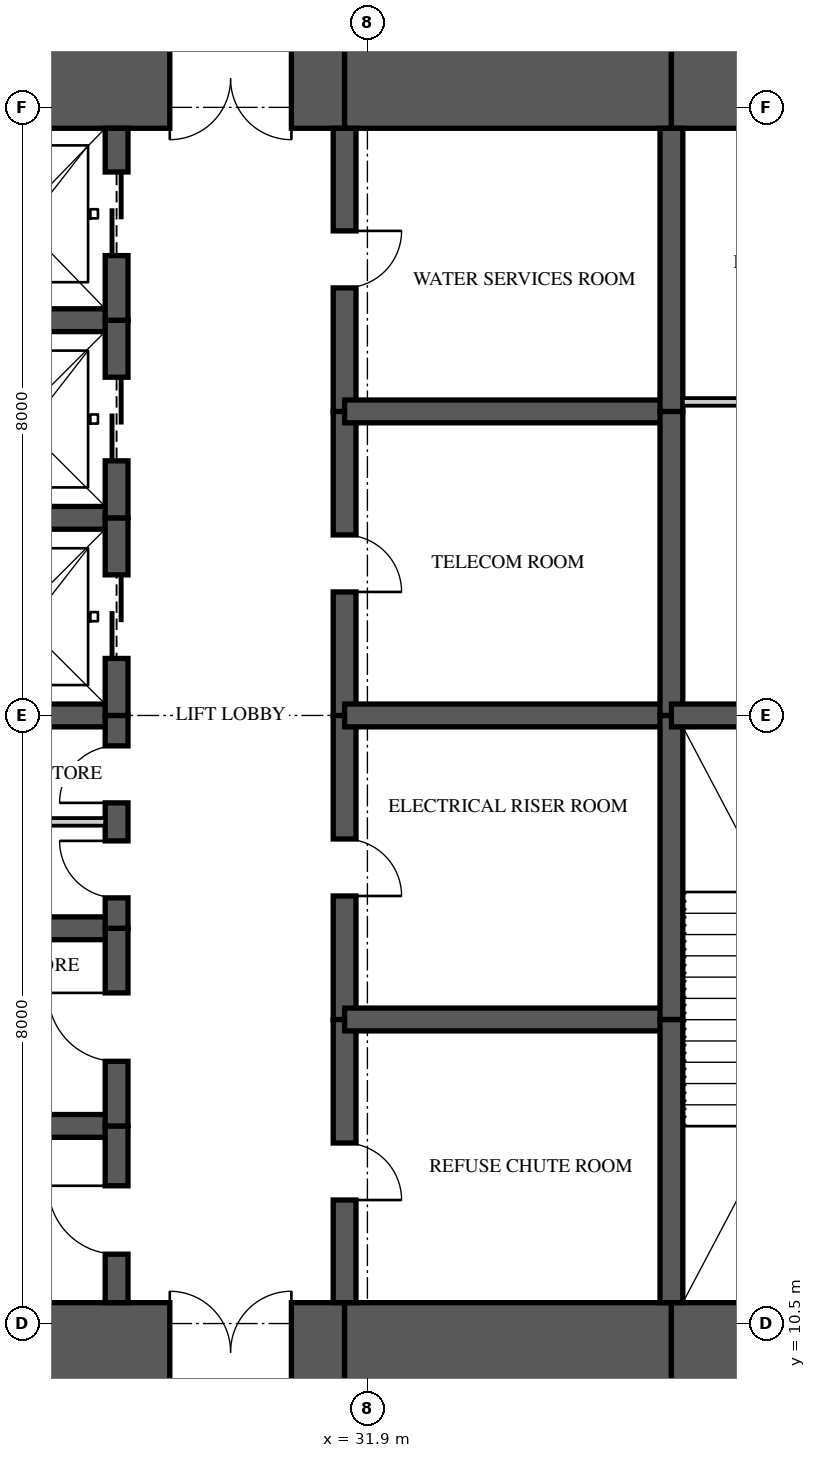
"""IFC4 building model, lengths in metres.
Left out: names, types, materials, properties, quantities, classifications, styles, units other than length and angle.
Written with IfcOpenShell. Run it as: python <this file> out.ifc"""

import sys

from ifc_helpers import new_model, si_unit, direction, frame, frame_2d, origin, place, context, subcontext, project, spatial, rectangle, extrude, element, fill, save


model = new_model("IFC4")
c1 = context("Model", 3, precision=1e-05, world=origin(), true_north=direction((0.0, 1.0)))
c2 = subcontext(c1, "Body", "Model", "MODEL_VIEW")
j1 = project(units=[si_unit("LENGTHUNIT", "METRE"), si_unit("PLANEANGLEUNIT", "RADIAN")], contexts=[c1])
p1 = place(None, origin())
s1 = spatial("IfcSite", under=j1, at=p1, CompositionType="ELEMENT")
p2 = place(p1, origin())
s2 = spatial("IfcBuilding", under=s1, at=p2, CompositionType="ELEMENT")
p3 = place(p2, frame((0.0, 0.0, 184.5)))
s3 = spatial("IfcBuildingStorey", under=s2, at=p3, CompositionType="ELEMENT", Elevation=184.5)
p4 = place(p3, frame((26.0, 10.125, 0.0), z_axis=(0.0, 0.0, 1.0), x_axis=(1.0, 0.0, 0.0)))
e1 = element("IfcWall", 1, at=p4, inside=s3, PredefinedType="SHEAR", context=c2, shape_type="SweptSolid", body=[
    extrude(rectangle(XDim=5.6, YDim=1.3, at=frame_2d((2.8, 0.0))), origin(), (0.0, 0.0, 1.0), 3.35),
])
p5 = place(p4, frame((3.3, 0.0, 0.0)))
e2 = element("IfcOpeningElement", 2, at=p5, cuts=e1, PredefinedType="OPENING", context=c2, shape_type="SweptSolid", body=[
    extrude(rectangle(XDim=1.6, YDim=2.1, at=frame_2d((0.8, 1.05))), frame((0.0, 0.66, 0.0), z_axis=(0.0, -1.0, 0.0), x_axis=(1.0, 0.0, 0.0)), (0.0, 0.0, 1.0), 1.32),
])
p6 = place(p3, frame((31.6, 10.125, 0.0), z_axis=(0.0, 0.0, 1.0), x_axis=(1.0, 0.0, 0.0)))
e3 = element("IfcWall", 3, at=p6, inside=s3, PredefinedType="SHEAR", context=c2, shape_type="SweptSolid", body=[
    extrude(rectangle(XDim=4.3, YDim=1.3, at=frame_2d((2.15, 0.0))), origin(), (0.0, 0.0, 1.0), 3.35),
])
p7 = place(p3, frame((35.9, 10.125, 0.0), z_axis=(0.0, 0.0, 1.0), x_axis=(1.0, 0.0, 0.0)))
e4 = element("IfcWall", 4, at=p7, inside=s3, PredefinedType="SHEAR", context=c2, shape_type="SweptSolid", body=[
    extrude(rectangle(XDim=8.25, YDim=1.3, at=frame_2d((4.125, 0.0))), origin(), (0.0, 0.0, 1.0), 3.35),
])
p8 = place(p7, frame((2.7, 0.0, 0.0)))
e5 = element("IfcOpeningElement", 5, at=p8, cuts=e4, PredefinedType="OPENING", context=c2, shape_type="SweptSolid", body=[
    extrude(rectangle(XDim=1.0, YDim=2.1, at=frame_2d((0.5, 1.05))), frame((0.0, 0.66, 0.0), z_axis=(0.0, -1.0, 0.0), x_axis=(1.0, 0.0, 0.0)), (0.0, 0.0, 1.0), 1.32),
])
p9 = place(p3, frame((44.15, 26.875, 0.0), z_axis=(0.0, 0.0, 1.0), x_axis=(-1.0, 0.0, 0.0)))
e6 = element("IfcWall", 6, at=p9, inside=s3, PredefinedType="SHEAR", context=c2, shape_type="SweptSolid", body=[
    extrude(rectangle(XDim=8.25, YDim=1.3, at=frame_2d((4.125, 0.0))), origin(), (0.0, 0.0, 1.0), 3.35),
])
p10 = place(p9, frame((5.65, 0.0, 0.0)))
e7 = element("IfcOpeningElement", 7, at=p10, cuts=e6, PredefinedType="OPENING", context=c2, shape_type="SweptSolid", body=[
    extrude(rectangle(XDim=0.9, YDim=2.1, at=frame_2d((0.45, 1.05))), frame((0.0, 0.66, 0.0), z_axis=(0.0, -1.0, 0.0), x_axis=(1.0, 0.0, 0.0)), (0.0, 0.0, 1.0), 1.32),
])
p11 = place(p3, frame((35.9, 26.875, 0.0), z_axis=(0.0, 0.0, 1.0), x_axis=(-1.0, 0.0, 0.0)))
e8 = element("IfcWall", 8, at=p11, inside=s3, PredefinedType="SHEAR", context=c2, shape_type="SweptSolid", body=[
    extrude(rectangle(XDim=4.3, YDim=1.3, at=frame_2d((2.15, 0.0))), origin(), (0.0, 0.0, 1.0), 3.35),
])
p12 = place(p3, frame((31.6, 26.875, 0.0), z_axis=(0.0, 0.0, 1.0), x_axis=(-1.0, 0.0, 0.0)))
e9 = element("IfcWall", 9, at=p12, inside=s3, PredefinedType="SHEAR", context=c2, shape_type="SweptSolid", body=[
    extrude(rectangle(XDim=5.6, YDim=1.3, at=frame_2d((2.8, 0.0))), origin(), (0.0, 0.0, 1.0), 3.35),
])
p13 = place(p12, frame((0.7, 0.0, 0.0)))
e10 = element("IfcOpeningElement", 10, at=p13, cuts=e9, PredefinedType="OPENING", context=c2, shape_type="SweptSolid", body=[
    extrude(rectangle(XDim=1.6, YDim=2.1, at=frame_2d((0.8, 1.05))), frame((0.0, 0.66, 0.0), z_axis=(0.0, -1.0, 0.0), x_axis=(1.0, 0.0, 0.0)), (0.0, 0.0, 1.0), 1.32),
])
p14 = place(p3, frame((28.6, 10.775, 0.0), z_axis=(0.0, 0.0, 1.0), x_axis=(0.0, 1.0, 0.0)))
e11 = element("IfcWall", 11, at=p14, inside=s3, PredefinedType="SHEAR", context=c2, shape_type="SweptSolid", body=[
    extrude(rectangle(XDim=2.325, YDim=0.3, at=frame_2d((1.163, 0.0))), origin(), (0.0, 0.0, 1.0), 3.35),
])
p15 = place(p14, frame((0.637, 0.0, 0.0)))
e12 = element("IfcOpeningElement", 12, at=p15, cuts=e11, PredefinedType="OPENING", context=c2, shape_type="SweptSolid", body=[
    extrude(rectangle(XDim=0.9, YDim=2.1, at=frame_2d((0.45, 1.05))), frame((0.0, 0.16, 0.0), z_axis=(0.0, -1.0, 0.0), x_axis=(1.0, 0.0, 0.0)), (0.0, 0.0, 1.0), 0.32),
])
p16 = place(p3, frame((28.6, 13.1, 0.0), z_axis=(0.0, 0.0, 1.0), x_axis=(0.0, 1.0, 0.0)))
e13 = element("IfcWall", 13, at=p16, inside=s3, PredefinedType="SHEAR", context=c2, shape_type="SweptSolid", body=[
    extrude(rectangle(XDim=2.6, YDim=0.3, at=frame_2d((1.3, 0.0))), origin(), (0.0, 0.0, 1.0), 3.35),
])
p17 = place(p16, frame((0.85, 0.0, 0.0)))
e14 = element("IfcOpeningElement", 14, at=p17, cuts=e13, PredefinedType="OPENING", context=c2, shape_type="SweptSolid", body=[
    extrude(rectangle(XDim=0.9, YDim=2.1, at=frame_2d((0.45, 1.05))), frame((0.0, 0.16, 0.0), z_axis=(0.0, -1.0, 0.0), x_axis=(1.0, 0.0, 0.0)), (0.0, 0.0, 1.0), 0.32),
])
p18 = place(p3, frame((28.6, 15.7, 0.0), z_axis=(0.0, 0.0, 1.0), x_axis=(0.0, 1.0, 0.0)))
e15 = element("IfcWall", 15, at=p18, inside=s3, PredefinedType="SHEAR", context=c2, shape_type="SweptSolid", body=[
    extrude(rectangle(XDim=2.8, YDim=0.3, at=frame_2d((1.4, 0.0))), origin(), (0.0, 0.0, 1.0), 3.35),
])
p19 = place(p18, frame((0.4, 0.0, 0.0)))
e16 = element("IfcOpeningElement", 16, at=p19, cuts=e15, PredefinedType="OPENING", context=c2, shape_type="SweptSolid", body=[
    extrude(rectangle(XDim=0.75, YDim=2.1, at=frame_2d((0.375, 1.05))), frame((0.0, 0.16, 0.0), z_axis=(0.0, -1.0, 0.0), x_axis=(1.0, 0.0, 0.0)), (0.0, 0.0, 1.0), 0.32),
])
p20 = place(p18, frame((1.65, 0.0, 0.0)))
e17 = element("IfcOpeningElement", 17, at=p20, cuts=e15, PredefinedType="OPENING", context=c2, shape_type="SweptSolid", body=[
    extrude(rectangle(XDim=0.75, YDim=2.1, at=frame_2d((0.375, 1.05))), frame((0.0, 0.16, 0.0), z_axis=(0.0, -1.0, 0.0), x_axis=(1.0, 0.0, 0.0)), (0.0, 0.0, 1.0), 0.32),
])
p21 = place(p3, frame((28.6, 18.5, 0.0), z_axis=(0.0, 0.0, 1.0), x_axis=(0.0, 1.0, 0.0)))
e18 = element("IfcWall", 18, at=p21, inside=s3, PredefinedType="SHEAR", context=c2, shape_type="SweptSolid", body=[
    extrude(rectangle(XDim=2.6, YDim=0.3, at=frame_2d((1.3, 0.0))), origin(), (0.0, 0.0, 1.0), 3.35),
])
p22 = place(p21, frame((0.75, 0.0, 0.0)))
e19 = element("IfcOpeningElement", 19, at=p22, cuts=e18, PredefinedType="OPENING", context=c2, shape_type="SweptSolid", body=[
    extrude(rectangle(XDim=1.1, YDim=2.1, at=frame_2d((0.55, 1.05))), frame((0.0, 0.16, 0.0), z_axis=(0.0, -1.0, 0.0), x_axis=(1.0, 0.0, 0.0)), (0.0, 0.0, 1.0), 0.32),
])
p23 = place(p3, frame((28.6, 21.1, 0.0), z_axis=(0.0, 0.0, 1.0), x_axis=(0.0, 1.0, 0.0)))
e20 = element("IfcWall", 20, at=p23, inside=s3, PredefinedType="SHEAR", context=c2, shape_type="SweptSolid", body=[
    extrude(rectangle(XDim=2.6, YDim=0.3, at=frame_2d((1.3, 0.0))), origin(), (0.0, 0.0, 1.0), 3.35),
])
p24 = place(p23, frame((0.75, 0.0, 0.0)))
e21 = element("IfcOpeningElement", 21, at=p24, cuts=e20, PredefinedType="OPENING", context=c2, shape_type="SweptSolid", body=[
    extrude(rectangle(XDim=1.1, YDim=2.1, at=frame_2d((0.55, 1.05))), frame((0.0, 0.16, 0.0), z_axis=(0.0, -1.0, 0.0), x_axis=(1.0, 0.0, 0.0)), (0.0, 0.0, 1.0), 0.32),
])
p25 = place(p3, frame((28.6, 23.7, 0.0), z_axis=(0.0, 0.0, 1.0), x_axis=(0.0, 1.0, 0.0)))
e22 = element("IfcWall", 22, at=p25, inside=s3, PredefinedType="SHEAR", context=c2, shape_type="SweptSolid", body=[
    extrude(rectangle(XDim=2.525, YDim=0.3, at=frame_2d((1.263, 0.0))), origin(), (0.0, 0.0, 1.0), 3.35),
])
p26 = place(p25, frame((0.85, 0.0, 0.0)))
e23 = element("IfcOpeningElement", 23, at=p26, cuts=e22, PredefinedType="OPENING", context=c2, shape_type="SweptSolid", body=[
    extrude(rectangle(XDim=1.1, YDim=2.1, at=frame_2d((0.55, 1.05))), frame((0.0, 0.16, 0.0), z_axis=(0.0, -1.0, 0.0), x_axis=(1.0, 0.0, 0.0)), (0.0, 0.0, 1.0), 0.32),
])
p27 = place(p3, frame((31.6, 10.775, 0.0), z_axis=(0.0, 0.0, 1.0), x_axis=(0.0, 1.0, 0.0)))
e24 = element("IfcWall", 24, at=p27, inside=s3, PredefinedType="SHEAR", context=c2, shape_type="SweptSolid", body=[
    extrude(rectangle(XDim=3.725, YDim=0.3, at=frame_2d((1.863, 0.0))), origin(), (0.0, 0.0, 1.0), 3.35),
])
p28 = place(p27, frame((1.35, 0.0, 0.0)))
e25 = element("IfcOpeningElement", 25, at=p28, cuts=e24, PredefinedType="OPENING", context=c2, shape_type="SweptSolid", body=[
    extrude(rectangle(XDim=0.75, YDim=2.1, at=frame_2d((0.375, 1.05))), frame((0.0, 0.16, 0.0), z_axis=(0.0, -1.0, 0.0), x_axis=(1.0, 0.0, 0.0)), (0.0, 0.0, 1.0), 0.32),
])
p29 = place(p3, frame((31.6, 14.5, 0.0), z_axis=(0.0, 0.0, 1.0), x_axis=(0.0, 1.0, 0.0)))
e26 = element("IfcWall", 26, at=p29, inside=s3, PredefinedType="SHEAR", context=c2, shape_type="SweptSolid", body=[
    extrude(rectangle(XDim=4.0, YDim=0.3, at=frame_2d((2.0, 0.0))), origin(), (0.0, 0.0, 1.0), 3.35),
])
p30 = place(p29, frame((1.625, 0.0, 0.0)))
e27 = element("IfcOpeningElement", 27, at=p30, cuts=e26, PredefinedType="OPENING", context=c2, shape_type="SweptSolid", body=[
    extrude(rectangle(XDim=0.75, YDim=2.1, at=frame_2d((0.375, 1.05))), frame((0.0, 0.16, 0.0), z_axis=(0.0, -1.0, 0.0), x_axis=(1.0, 0.0, 0.0)), (0.0, 0.0, 1.0), 0.32),
])
p31 = place(p3, frame((31.6, 18.5, 0.0), z_axis=(0.0, 0.0, 1.0), x_axis=(0.0, 1.0, 0.0)))
e28 = element("IfcWall", 28, at=p31, inside=s3, PredefinedType="SHEAR", context=c2, shape_type="SweptSolid", body=[
    extrude(rectangle(XDim=4.0, YDim=0.3, at=frame_2d((2.0, 0.0))), origin(), (0.0, 0.0, 1.0), 3.35),
])
p32 = place(p31, frame((1.625, 0.0, 0.0)))
e29 = element("IfcOpeningElement", 29, at=p32, cuts=e28, PredefinedType="OPENING", context=c2, shape_type="SweptSolid", body=[
    extrude(rectangle(XDim=0.75, YDim=2.1, at=frame_2d((0.375, 1.05))), frame((0.0, 0.16, 0.0), z_axis=(0.0, -1.0, 0.0), x_axis=(1.0, 0.0, 0.0)), (0.0, 0.0, 1.0), 0.32),
])
p33 = place(p3, frame((31.6, 22.5, 0.0), z_axis=(0.0, 0.0, 1.0), x_axis=(0.0, 1.0, 0.0)))
e30 = element("IfcWall", 30, at=p33, inside=s3, PredefinedType="SHEAR", context=c2, shape_type="SweptSolid", body=[
    extrude(rectangle(XDim=3.725, YDim=0.3, at=frame_2d((1.863, 0.0))), origin(), (0.0, 0.0, 1.0), 3.35),
])
p34 = place(p33, frame((1.625, 0.0, 0.0)))
e31 = element("IfcOpeningElement", 31, at=p34, cuts=e30, PredefinedType="OPENING", context=c2, shape_type="SweptSolid", body=[
    extrude(rectangle(XDim=0.75, YDim=2.1, at=frame_2d((0.375, 1.05))), frame((0.0, 0.16, 0.0), z_axis=(0.0, -1.0, 0.0), x_axis=(1.0, 0.0, 0.0)), (0.0, 0.0, 1.0), 0.32),
])
p35 = place(p3, frame((35.9, 10.775, 0.0), z_axis=(0.0, 0.0, 1.0), x_axis=(0.0, 1.0, 0.0)))
e32 = element("IfcWall", 32, at=p35, inside=s3, PredefinedType="SHEAR", context=c2, shape_type="SweptSolid", body=[
    extrude(rectangle(XDim=3.725, YDim=0.3, at=frame_2d((1.863, 0.0))), origin(), (0.0, 0.0, 1.0), 3.35),
])
for number, where, z_axis, x_axis in (
    (33, (35.9, 14.5, 0.0), (0.0, 0.0, 1.0), (0.0, 1.0, 0.0)),
    (34, (35.9, 18.5, 0.0), (0.0, 0.0, 1.0), (0.0, 1.0, 0.0)),
):
    element("IfcWall", number, at=place(p3, frame(where, z_axis=z_axis, x_axis=x_axis)), inside=s3, PredefinedType="SHEAR", context=c2, shape_type="SweptSolid", body=[
        extrude(rectangle(XDim=4.0, YDim=0.3, at=frame_2d((2.0, 0.0))), origin(), (0.0, 0.0, 1.0), 3.35),
    ])
p36 = place(p3, frame((35.9, 22.5, 0.0), z_axis=(0.0, 0.0, 1.0), x_axis=(0.0, 1.0, 0.0)))
e35 = element("IfcWall", 35, at=p36, inside=s3, PredefinedType="SHEAR", context=c2, shape_type="SweptSolid", body=[
    extrude(rectangle(XDim=3.725, YDim=0.3, at=frame_2d((1.863, 0.0))), origin(), (0.0, 0.0, 1.0), 3.35),
])
for number, where, z_axis, x_axis in (
    (36, (26.0, 13.1, 0.0), (0.0, 0.0, 1.0), (1.0, 0.0, 0.0)),
    (37, (26.0, 15.7, 0.0), (0.0, 0.0, 1.0), (1.0, 0.0, 0.0)),
    (38, (26.0, 18.5, 0.0), (0.0, 0.0, 1.0), (1.0, 0.0, 0.0)),
    (39, (26.0, 21.1, 0.0), (0.0, 0.0, 1.0), (1.0, 0.0, 0.0)),
    (40, (26.0, 23.7, 0.0), (0.0, 0.0, 1.0), (1.0, 0.0, 0.0)),
):
    element("IfcWall", number, at=place(p3, frame(where, z_axis=z_axis, x_axis=x_axis)), inside=s3, PredefinedType="SHEAR", context=c2, shape_type="SweptSolid", body=[
        extrude(rectangle(XDim=2.6, YDim=0.3, at=frame_2d((1.3, 0.0))), origin(), (0.0, 0.0, 1.0), 3.35),
    ])
for number, where, z_axis, x_axis in (
    (41, (31.6, 14.5, 0.0), (0.0, 0.0, 1.0), (1.0, 0.0, 0.0)),
    (42, (31.6, 18.5, 0.0), (0.0, 0.0, 1.0), (1.0, 0.0, 0.0)),
    (43, (31.6, 22.5, 0.0), (0.0, 0.0, 1.0), (1.0, 0.0, 0.0)),
):
    element("IfcWall", number, at=place(p3, frame(where, z_axis=z_axis, x_axis=x_axis)), inside=s3, PredefinedType="SHEAR", context=c2, shape_type="SweptSolid", body=[
        extrude(rectangle(XDim=4.3, YDim=0.3, at=frame_2d((2.15, 0.0))), origin(), (0.0, 0.0, 1.0), 3.35),
    ])
p37 = place(p3, frame((35.9, 18.5, 0.0), z_axis=(0.0, 0.0, 1.0), x_axis=(1.0, 0.0, 0.0)))
e44 = element("IfcWall", 44, at=p37, inside=s3, PredefinedType="SHEAR", context=c2, shape_type="SweptSolid", body=[
    extrude(rectangle(XDim=4.3, YDim=0.3, at=frame_2d((2.15, 0.0))), origin(), (0.0, 0.0, 1.0), 3.35),
])
p38 = place(p3, frame((36.05, 22.625, 0.0), z_axis=(0.0, 0.0, 1.0), x_axis=(1.0, 0.0, 0.0)))
e45 = element("IfcWall", 45, at=p38, inside=s3, PredefinedType="PARTITIONING", context=c2, shape_type="SweptSolid", body=[
    extrude(rectangle(XDim=4.0, YDim=0.1, at=frame_2d((2.0, 0.0))), origin(), (0.0, 0.0, 1.0), 3.11),
])
p39 = place(p38, frame((1.55, 0.0, 0.0)))
e46 = element("IfcOpeningElement", 46, at=p39, cuts=e45, PredefinedType="OPENING", context=c2, shape_type="SweptSolid", body=[
    extrude(rectangle(XDim=0.9, YDim=2.1, at=frame_2d((0.45, 1.05))), frame((0.0, 0.06, 0.0), z_axis=(0.0, -1.0, 0.0), x_axis=(1.0, 0.0, 0.0)), (0.0, 0.0, 1.0), 0.12),
])
p40 = place(p3, frame((26.15, 17.1, 0.0), z_axis=(0.0, 0.0, 1.0), x_axis=(1.0, 0.0, 0.0)))
e47 = element("IfcWall", 47, at=p40, inside=s3, PredefinedType="PARTITIONING", context=c2, shape_type="SweptSolid", body=[
    extrude(rectangle(XDim=2.3, YDim=0.1, at=frame_2d((1.15, 0.0))), origin(), (0.0, 0.0, 1.0), 3.11),
])
p41 = place(p22, origin())
e48 = element("IfcDoor", 48, at=p41, inside=s3, OperationType="SLIDING_TO_LEFT", PredefinedType="DOOR", context=c2, shape_type="SweptSolid", body=[
    extrude(rectangle(XDim=1.1, YDim=2.1, at=frame_2d((0.55, 1.05))), frame((0.0, 0.025, 0.0), z_axis=(0.0, -1.0, 0.0), x_axis=(1.0, 0.0, 0.0)), (0.0, 0.0, 1.0), 0.05),
])
fill(e19, e48)
p42 = place(p24, origin())
e49 = element("IfcDoor", 49, at=p42, inside=s3, OperationType="SLIDING_TO_LEFT", PredefinedType="DOOR", context=c2, shape_type="SweptSolid", body=[
    extrude(rectangle(XDim=1.1, YDim=2.1, at=frame_2d((0.55, 1.05))), frame((0.0, 0.025, 0.0), z_axis=(0.0, -1.0, 0.0), x_axis=(1.0, 0.0, 0.0)), (0.0, 0.0, 1.0), 0.05),
])
fill(e21, e49)
p43 = place(p26, origin())
e50 = element("IfcDoor", 50, at=p43, inside=s3, OperationType="SLIDING_TO_LEFT", PredefinedType="DOOR", context=c2, shape_type="SweptSolid", body=[
    extrude(rectangle(XDim=1.1, YDim=2.1, at=frame_2d((0.55, 1.05))), frame((0.0, 0.025, 0.0), z_axis=(0.0, -1.0, 0.0), x_axis=(1.0, 0.0, 0.0)), (0.0, 0.0, 1.0), 0.05),
])
fill(e23, e50)
p44 = place(p15, origin())
e51 = element("IfcDoor", 51, at=p44, inside=s3, OperationType="SINGLE_SWING_RIGHT", PredefinedType="DOOR", context=c2, shape_type="SweptSolid", body=[
    extrude(rectangle(XDim=0.9, YDim=2.1, at=frame_2d((0.45, 1.05))), frame((0.0, 0.025, 0.0), z_axis=(0.0, -1.0, 0.0), x_axis=(1.0, 0.0, 0.0)), (0.0, 0.0, 1.0), 0.05),
])
fill(e12, e51)
p45 = place(p17, origin())
e52 = element("IfcDoor", 52, at=p45, inside=s3, OperationType="SINGLE_SWING_RIGHT", PredefinedType="DOOR", context=c2, shape_type="SweptSolid", body=[
    extrude(rectangle(XDim=0.9, YDim=2.1, at=frame_2d((0.45, 1.05))), frame((0.0, 0.025, 0.0), z_axis=(0.0, -1.0, 0.0), x_axis=(1.0, 0.0, 0.0)), (0.0, 0.0, 1.0), 0.05),
])
fill(e14, e52)
p46 = place(p19, origin())
e53 = element("IfcDoor", 53, at=p46, inside=s3, OperationType="SINGLE_SWING_RIGHT", PredefinedType="DOOR", context=c2, shape_type="SweptSolid", body=[
    extrude(rectangle(XDim=0.75, YDim=2.1, at=frame_2d((0.375, 1.05))), frame((0.0, 0.025, 0.0), z_axis=(0.0, -1.0, 0.0), x_axis=(1.0, 0.0, 0.0)), (0.0, 0.0, 1.0), 0.05),
])
fill(e16, e53)
p47 = place(p20, origin())
e54 = element("IfcDoor", 54, at=p47, inside=s3, OperationType="SINGLE_SWING_LEFT", PredefinedType="DOOR", context=c2, shape_type="SweptSolid", body=[
    extrude(rectangle(XDim=0.75, YDim=2.1, at=frame_2d((0.375, 1.05))), frame((0.0, 0.025, 0.0), z_axis=(0.0, -1.0, 0.0), x_axis=(1.0, 0.0, 0.0)), (0.0, 0.0, 1.0), 0.05),
])
fill(e17, e54)
p48 = place(p5, origin())
e55 = element("IfcDoor", 55, at=p48, inside=s3, OperationType="DOUBLE_DOOR_SINGLE_SWING", PredefinedType="DOOR", context=c2, shape_type="SweptSolid", body=[
    extrude(rectangle(XDim=1.6, YDim=2.1, at=frame_2d((0.8, 1.05))), frame((0.0, 0.025, 0.0), z_axis=(0.0, -1.0, 0.0), x_axis=(1.0, 0.0, 0.0)), (0.0, 0.0, 1.0), 0.05),
])
fill(e2, e55)
p49 = place(p13, origin())
e56 = element("IfcDoor", 56, at=p49, inside=s3, OperationType="DOUBLE_DOOR_SINGLE_SWING", PredefinedType="DOOR", context=c2, shape_type="SweptSolid", body=[
    extrude(rectangle(XDim=1.6, YDim=2.1, at=frame_2d((0.8, 1.05))), frame((0.0, 0.025, 0.0), z_axis=(0.0, -1.0, 0.0), x_axis=(1.0, 0.0, 0.0)), (0.0, 0.0, 1.0), 0.05),
])
fill(e10, e56)
p50 = place(p28, frame((0.75, 0.0, 0.0), z_axis=(0.0, 0.0, 1.0), x_axis=(-1.0, 0.0, 0.0)))
e57 = element("IfcDoor", 57, at=p50, inside=s3, OperationType="SINGLE_SWING_RIGHT", PredefinedType="DOOR", context=c2, shape_type="SweptSolid", body=[
    extrude(rectangle(XDim=0.75, YDim=2.1, at=frame_2d((0.375, 1.05))), frame((0.0, 0.025, 0.0), z_axis=(0.0, -1.0, 0.0), x_axis=(1.0, 0.0, 0.0)), (0.0, 0.0, 1.0), 0.05),
])
fill(e25, e57)
p51 = place(p30, frame((0.75, 0.0, 0.0), z_axis=(0.0, 0.0, 1.0), x_axis=(-1.0, 0.0, 0.0)))
e58 = element("IfcDoor", 58, at=p51, inside=s3, OperationType="SINGLE_SWING_RIGHT", PredefinedType="DOOR", context=c2, shape_type="SweptSolid", body=[
    extrude(rectangle(XDim=0.75, YDim=2.1, at=frame_2d((0.375, 1.05))), frame((0.0, 0.025, 0.0), z_axis=(0.0, -1.0, 0.0), x_axis=(1.0, 0.0, 0.0)), (0.0, 0.0, 1.0), 0.05),
])
fill(e27, e58)
p52 = place(p32, frame((0.75, 0.0, 0.0), z_axis=(0.0, 0.0, 1.0), x_axis=(-1.0, 0.0, 0.0)))
e59 = element("IfcDoor", 59, at=p52, inside=s3, OperationType="SINGLE_SWING_RIGHT", PredefinedType="DOOR", context=c2, shape_type="SweptSolid", body=[
    extrude(rectangle(XDim=0.75, YDim=2.1, at=frame_2d((0.375, 1.05))), frame((0.0, 0.025, 0.0), z_axis=(0.0, -1.0, 0.0), x_axis=(1.0, 0.0, 0.0)), (0.0, 0.0, 1.0), 0.05),
])
fill(e29, e59)
p53 = place(p34, frame((0.75, 0.0, 0.0), z_axis=(0.0, 0.0, 1.0), x_axis=(-1.0, 0.0, 0.0)))
e60 = element("IfcDoor", 60, at=p53, inside=s3, OperationType="SINGLE_SWING_LEFT", PredefinedType="DOOR", context=c2, shape_type="SweptSolid", body=[
    extrude(rectangle(XDim=0.75, YDim=2.1, at=frame_2d((0.375, 1.05))), frame((0.0, 0.025, 0.0), z_axis=(0.0, -1.0, 0.0), x_axis=(1.0, 0.0, 0.0)), (0.0, 0.0, 1.0), 0.05),
])
fill(e31, e60)
save(model, sys.argv[1])
